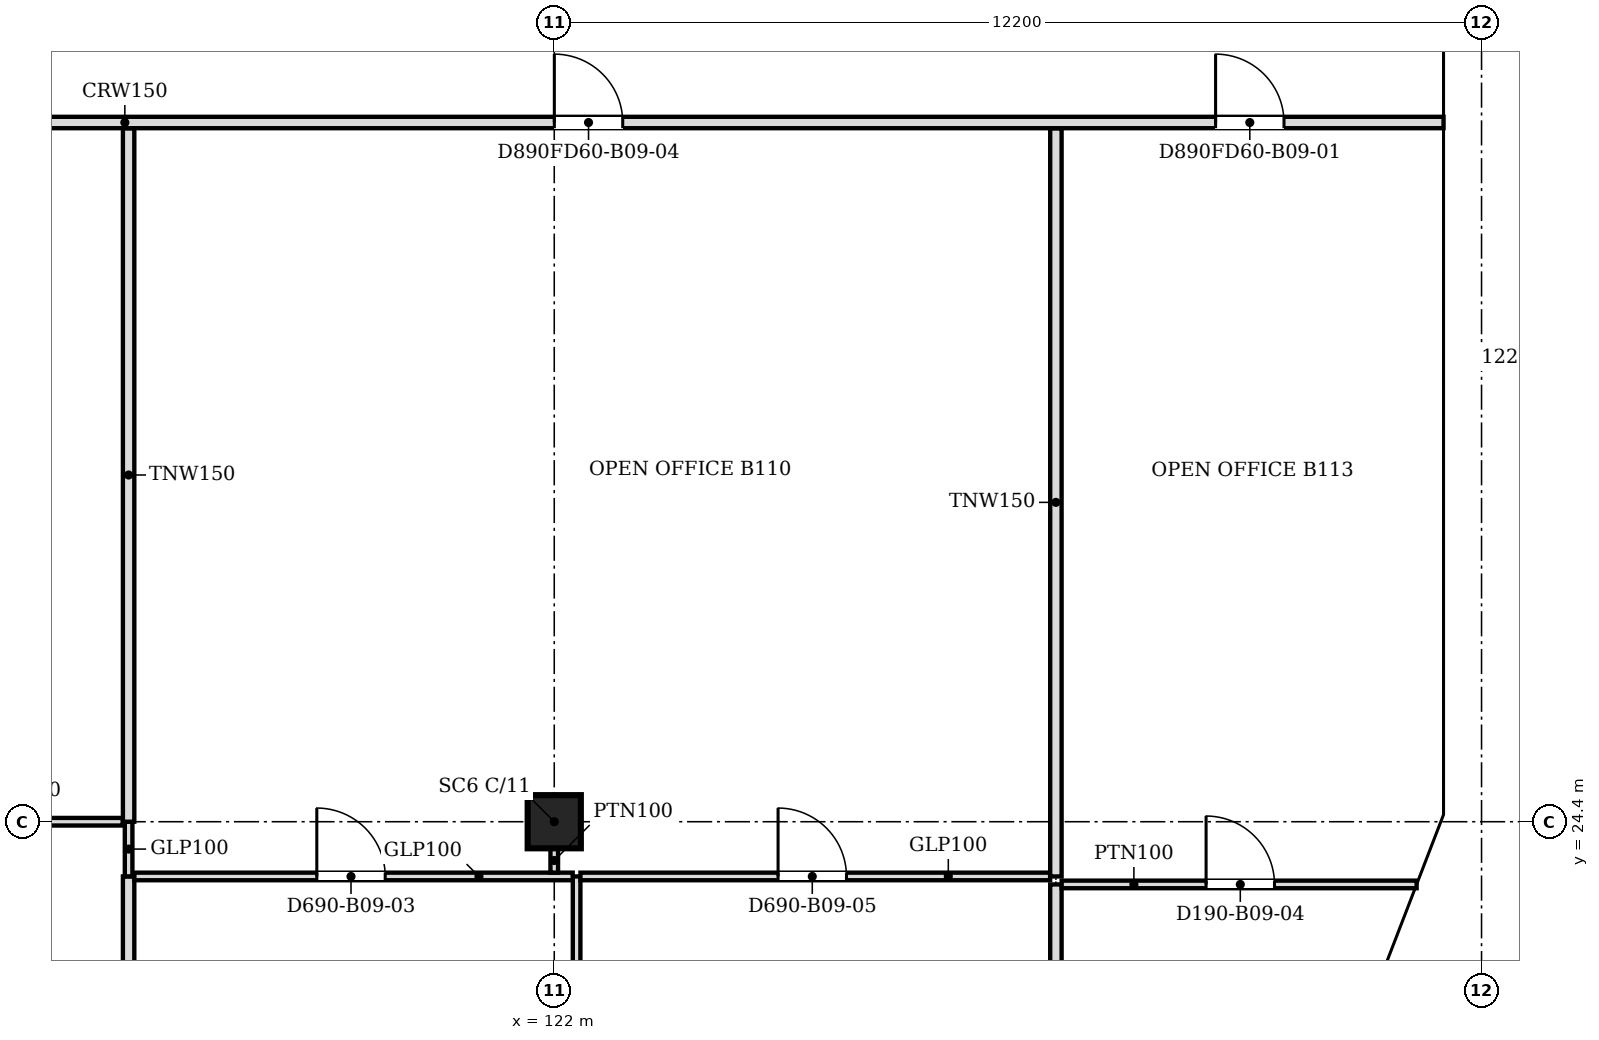
"""IFC4 building model, lengths in metres.
Left out: names, types, materials, properties, quantities, classifications, styles, units other than length and angle.
Written with IfcOpenShell. Run it as: python <this file> out.ifc"""

import sys

from ifc_helpers import new_model, si_unit, direction, frame, frame_2d, origin, origin_2d, place, context, subcontext, project, spatial, polyline, rectangle, outline, extrude, faceted_brep, source, transform, mapped, element, fill, save


model = new_model("IFC4")
c1 = context("Model", 3, precision=1e-05, world=origin(), true_north=direction((0.0, 1.0)))
c2 = subcontext(c1, "Body", "Model", "MODEL_VIEW")
j1 = project(units=[si_unit("LENGTHUNIT", "METRE"), si_unit("PLANEANGLEUNIT", "RADIAN")], contexts=[c1])
p1 = place(None, origin())
s1 = spatial("IfcSite", under=j1, at=p1, CompositionType="ELEMENT")
p2 = place(p1, origin())
s2 = spatial("IfcBuilding", under=s1, at=p2, CompositionType="ELEMENT")
p3 = place(p2, frame((0.0, 0.0, 87.6)))
s3 = spatial("IfcBuildingStorey", under=s2, at=p3, CompositionType="ELEMENT", Elevation=87.6)
p4 = place(p3, frame((122.0, 24.4, 0.0), z_axis=(0.0, 0.0, 1.0), x_axis=(1.0, 0.0, 0.0)))
e1 = element("IfcColumn", 1, at=p4, inside=s3, PredefinedType="COLUMN", context=c2, shape_type="SweptSolid", body=[
    extrude(rectangle(XDim=0.7, YDim=0.7, at=origin_2d()), origin(), (0.0, 0.0, 1.0), 3.6),
])
m1 = source(origin(), c2, "Body", "Brep", [
    faceted_brep([(2.95, -0.25, 0.0), (2.997, -0.25, 0.059), (2.997, -0.25, 7.541), (2.95, -0.25, 7.6), (0.0, -0.25, 3.8), (0.053, 0.25, 3.868), (2.904, 0.25, 7.54), (2.904, 0.25, 0.06), (0.053, 0.25, 3.732), (2.95, 0.0, 0.0), (2.95, 0.0, 7.6), (0.0, 0.0, 3.8)], [[[0, 1, 2, 3, 4]], [[5, 6, 7, 8]], [[1, 0, 9]], [[10, 3, 2]], [[6, 5, 11, 4, 3, 10]], [[8, 7, 9, 0, 4, 11]], [[8, 11, 5]], [[1, 9, 7, 6, 10, 2]]]),
])
p5 = place(p3, frame((132.888, 21.694, -3.8), z_axis=(0.0, 0.0, 1.0), x_axis=(0.359901446078, 0.932990326376, 0.0)))
e2 = element("IfcWall", 2, at=p5, inside=s3, PredefinedType="SOLIDWALL", context=c2, shape_type="MappedRepresentation", body=[
    mapped(m1, transform((0.0, 0.0, 0.0), scale=1.0)),
])
m2 = source(origin(), c2, "Body", "SweptSolid", [
    extrude(outline(polyline([(2.75, 6.935), (0.316, 3.8), (2.75, 0.665), (2.75, 6.935)])), frame((0.0, 0.26, 0.0), z_axis=(0.0, -1.0, 0.0), x_axis=(1.0, 0.0, 0.0)), (0.0, 0.0, 1.0), 0.52),
])
p6 = place(p5, origin())
e3 = element("IfcOpeningElement", 3, at=p6, cuts=e2, PredefinedType="OPENING", context=c2, shape_type="MappedRepresentation", body=[
    mapped(m2, transform((0.0, 0.0, 0.0), scale=1.0)),
])
m3 = source(origin(), c2, "Body", "Brep", [
    faceted_brep([(0.047, -0.25, 0.0), (3.05, -0.25, 3.8), (0.047, -0.25, 7.6), (0.0, -0.25, 7.54), (0.0, -0.25, 0.06), (0.093, 0.25, 7.541), (3.05, 0.25, 3.8), (0.093, 0.25, 0.059), (0.047, 0.0, 0.0), (0.047, 0.0, 7.6)], [[[0, 1, 2, 3, 4]], [[5, 6, 7]], [[7, 6, 1, 0, 8]], [[6, 5, 9, 2, 1]], [[3, 2, 9]], [[8, 0, 4]], [[7, 8, 4, 3, 9, 5]]]),
])
p7 = place(p3, frame((133.95, 24.4, -3.8), z_axis=(0.0, 0.0, 1.0), x_axis=(0.0, 1.0, 0.0)))
e4 = element("IfcWall", 4, at=p7, inside=s3, PredefinedType="SOLIDWALL", context=c2, shape_type="MappedRepresentation", body=[
    mapped(m3, transform((0.0, 0.0, 0.0), scale=1.0)),
])
m4 = source(origin(), c2, "Body", "SweptSolid", [
    extrude(outline(polyline([(0.247, 0.656), (2.731, 3.8), (0.247, 6.944), (0.247, 0.656)])), frame((0.0, 0.26, 0.0), z_axis=(0.0, -1.0, 0.0), x_axis=(1.0, 0.0, 0.0)), (0.0, 0.0, 1.0), 0.52),
])
p8 = place(p7, origin())
e5 = element("IfcOpeningElement", 5, at=p8, cuts=e4, PredefinedType="OPENING", context=c2, shape_type="MappedRepresentation", body=[
    mapped(m4, transform((0.0, 0.0, 0.0), scale=1.0)),
])
m5 = source(origin(), c2, "Body", "SweptSolid", [
    extrude(outline(polyline([(3.05, 0.0), (6.1, 3.8), (3.05, 7.6), (0.0, 3.8), (3.05, 0.0)])), frame((0.0, 0.25, 0.0), z_axis=(0.0, -1.0, 0.0), x_axis=(1.0, 0.0, 0.0)), (0.0, 0.0, 1.0), 0.5),
])
p9 = place(p3, frame((133.95, 27.45, -3.8), z_axis=(0.0, 0.0, 1.0), x_axis=(0.0, 1.0, 0.0)))
e6 = element("IfcWall", 6, at=p9, inside=s3, PredefinedType="SOLIDWALL", context=c2, shape_type="MappedRepresentation", body=[
    mapped(m5, transform((0.0, 0.0, 0.0), scale=1.0)),
])
m6 = source(origin(), c2, "Body", "SweptSolid", [
    extrude(outline(polyline([(3.05, 0.399), (5.78, 3.8), (3.05, 7.2), (0.321, 3.8), (3.05, 0.399)])), frame((0.0, 0.26, 0.0), z_axis=(0.0, -1.0, 0.0), x_axis=(1.0, 0.0, 0.0)), (0.0, 0.0, 1.0), 0.52),
])
p10 = place(p9, origin())
e7 = element("IfcOpeningElement", 7, at=p10, cuts=e6, PredefinedType="OPENING", context=c2, shape_type="MappedRepresentation", body=[
    mapped(m6, transform((0.0, 0.0, 0.0), scale=1.0)),
])
m7 = source(origin(), c2, "Body", "Brep", [
    faceted_brep([(3.05, -0.25, 0.0), (6.1, -0.25, 3.8), (6.1, -0.25, 3.8), (3.05, -0.25, 7.6), (0.0, -0.25, 3.8), (0.0, 0.25, 3.8), (3.05, 0.25, 7.6), (6.1, 0.25, 3.8), (6.1, 0.25, 3.8), (3.05, 0.25, 0.0)], [[[0, 1, 2, 3, 4]], [[5, 6, 7, 8, 9]], [[9, 8, 1, 0]], [[7, 6, 3, 2]], [[6, 5, 4, 3]], [[5, 9, 0, 4]], [[1, 8, 7, 2]]]),
])
p11 = place(p3, frame((133.95, 33.55, -3.8), z_axis=(0.0, 0.0, 1.0), x_axis=(0.0, 1.0, 0.0)))
e8 = element("IfcWall", 8, at=p11, inside=s3, PredefinedType="SOLIDWALL", context=c2, shape_type="MappedRepresentation", body=[
    mapped(m7, transform((0.0, 0.0, 0.0), scale=1.0)),
])
p12 = place(p11, origin())
e9 = element("IfcOpeningElement", 9, at=p12, cuts=e8, PredefinedType="OPENING", context=c2, shape_type="MappedRepresentation", body=[
    mapped(m6, transform((0.0, 0.0, 0.0), scale=1.0)),
])
p13 = place(p2, frame((0.0, 0.0, 91.4)))
s4 = spatial("IfcBuildingStorey", under=s2, at=p13, CompositionType="ELEMENT", Elevation=91.4)
m8 = source(origin(), c2, "Body", "Brep", [
    faceted_brep([(0.053, -0.25, 0.0), (3.003, -0.25, 3.8), (0.053, -0.25, 7.6), (0.0, -0.25, 7.531), (0.0, -0.25, 0.068), (0.106, 0.25, 7.532), (2.957, 0.25, 3.86), (2.957, 0.25, 3.74), (0.106, 0.25, 0.068), (3.003, 0.0, 3.8), (0.053, 0.0, 0.0), (0.053, 0.0, 7.6)], [[[0, 1, 2, 3, 4]], [[5, 6, 7, 8]], [[8, 7, 9, 1, 0, 10]], [[6, 5, 11, 2, 1, 9]], [[3, 2, 11]], [[10, 0, 4]], [[8, 10, 4, 3, 11, 5]], [[9, 7, 6]]]),
])
p14 = place(p13, frame((132.869, 21.644, -3.8), z_axis=(0.0, 0.0, 1.0), x_axis=(0.359855894603, 0.933007896601, 0.0)))
e10 = element("IfcWall", 10, at=p14, inside=s4, PredefinedType="SOLIDWALL", context=c2, shape_type="MappedRepresentation", body=[
    mapped(m8, transform((0.0, 0.0, 0.0), scale=1.0)),
])
m9 = source(origin(), c2, "Body", "SweptSolid", [
    extrude(outline(polyline([(0.253, 0.665), (2.687, 3.8), (0.253, 6.935), (0.253, 0.665)])), frame((0.0, 0.26, 0.0), z_axis=(0.0, -1.0, 0.0), x_axis=(1.0, 0.0, 0.0)), (0.0, 0.0, 1.0), 0.52),
])
p15 = place(p14, origin())
e11 = element("IfcOpeningElement", 11, at=p15, cuts=e10, PredefinedType="OPENING", context=c2, shape_type="MappedRepresentation", body=[
    mapped(m9, transform((0.0, 0.0, 0.0), scale=1.0)),
])
m10 = source(origin(), c2, "Body", "Brep", [
    faceted_brep([(3.003, -0.25, 0.0), (6.053, -0.25, 3.8), (3.003, -0.25, 7.6), (0.0, -0.25, 3.8), (0.047, 0.25, 3.859), (3.003, 0.25, 7.6), (6.053, 0.25, 3.8), (3.003, 0.25, 0.0), (0.047, 0.25, 3.741), (0.0, 0.0, 3.8)], [[[0, 1, 2, 3]], [[4, 5, 6, 7, 8]], [[7, 6, 1, 0]], [[6, 5, 2, 1]], [[5, 4, 9, 3, 2]], [[8, 7, 0, 3, 9]], [[8, 9, 4]]]),
])
p16 = place(p13, frame((133.95, 24.447, -3.8), z_axis=(0.0, 0.0, 1.0), x_axis=(0.0, 1.0, 0.0)))
e12 = element("IfcWall", 12, at=p16, inside=s4, PredefinedType="SOLIDWALL", context=c2, shape_type="MappedRepresentation", body=[
    mapped(m10, transform((0.0, 0.0, 0.0), scale=1.0)),
])
m11 = source(origin(), c2, "Body", "SweptSolid", [
    extrude(outline(polyline([(3.005, 0.401), (5.733, 3.8), (3.005, 7.199), (0.319, 3.8), (3.005, 0.401)])), frame((0.0, 0.26, 0.0), z_axis=(0.0, -1.0, 0.0), x_axis=(1.0, 0.0, 0.0)), (0.0, 0.0, 1.0), 0.52),
])
p17 = place(p16, origin())
e13 = element("IfcOpeningElement", 13, at=p17, cuts=e12, PredefinedType="OPENING", context=c2, shape_type="MappedRepresentation", body=[
    mapped(m11, transform((0.0, 0.0, 0.0), scale=1.0)),
])
m12 = source(origin(), c2, "Body", "SweptSolid", [
    extrude(outline(polyline([(3.05, 0.0), (6.1, 3.8), (3.05, 7.6), (0.0, 3.8), (3.05, 0.0)])), frame((0.0, 0.25, 0.0), z_axis=(0.0, -1.0, 0.0), x_axis=(1.0, 0.0, 0.0)), (0.0, 0.0, 1.0), 0.5),
])
p18 = place(p13, frame((133.95, 30.5, -3.8), z_axis=(0.0, 0.0, 1.0), x_axis=(0.0, 1.0, 0.0)))
e14 = element("IfcWall", 14, at=p18, inside=s4, PredefinedType="SOLIDWALL", context=c2, shape_type="MappedRepresentation", body=[
    mapped(m12, transform((0.0, 0.0, 0.0), scale=1.0)),
])
m13 = source(origin(), c2, "Body", "SweptSolid", [
    extrude(outline(polyline([(3.05, 0.399), (5.78, 3.8), (3.05, 7.2), (0.321, 3.8), (3.05, 0.399)])), frame((0.0, 0.26, 0.0), z_axis=(0.0, -1.0, 0.0), x_axis=(1.0, 0.0, 0.0)), (0.0, 0.0, 1.0), 0.52),
])
p19 = place(p18, origin())
e15 = element("IfcOpeningElement", 15, at=p19, cuts=e14, PredefinedType="OPENING", context=c2, shape_type="MappedRepresentation", body=[
    mapped(m13, transform((0.0, 0.0, 0.0), scale=1.0)),
])
p20 = place(p3, frame((116.4, 18.8, 0.0), z_axis=(0.0, 0.0, 1.0), x_axis=(0.0, 1.0, 0.0)))
e16 = element("IfcWall", 16, at=p20, inside=s3, PredefinedType="PARTITIONING", context=c2, shape_type="SweptSolid", body=[
    extrude(rectangle(XDim=4.88, YDim=0.15, at=frame_2d((2.44, 0.0))), origin(), (0.0, 0.0, 1.0), 3.067),
])
p21 = place(p3, frame((122.294, 18.8, 0.0), z_axis=(0.0, 0.0, 1.0), x_axis=(0.0, 1.0, 0.0)))
e17 = element("IfcWall", 17, at=p21, inside=s3, PredefinedType="PARTITIONING", context=c2, shape_type="SweptSolid", body=[
    extrude(rectangle(XDim=4.88, YDim=0.1, at=frame_2d((2.44, 0.0))), origin(), (0.0, 0.0, 1.0), 3.067),
])
p22 = place(p3, frame((128.6, 19.029, 0.0), z_axis=(0.0, 0.0, 1.0), x_axis=(0.0, 1.0, 0.0)))
e18 = element("IfcWall", 18, at=p22, inside=s3, PredefinedType="PARTITIONING", context=c2, shape_type="SweptSolid", body=[
    extrude(rectangle(XDim=4.546, YDim=0.15, at=frame_2d((2.273, 0.0))), origin(), (0.0, 0.0, 1.0), 3.067),
])
p23 = place(p3, frame((133.346, 23.575, 0.0), z_axis=(0.0, 0.0, 1.0), x_axis=(-1.0, 0.0, 0.0)))
e19 = element("IfcWall", 19, at=p23, inside=s3, PredefinedType="PARTITIONING", context=c2, shape_type="SweptSolid", body=[
    extrude(rectangle(XDim=4.67, YDim=0.1, at=frame_2d((2.335, 0.0))), origin(), (0.0, 0.0, 1.0), 3.067),
])
m14 = source(origin(), c2, "Body", "SweptSolid", [
    extrude(rectangle(XDim=0.9, YDim=2.1, at=frame_2d((0.45, 1.05))), frame((0.0, 0.06, 0.0), z_axis=(0.0, -1.0, 0.0), x_axis=(1.0, 0.0, 0.0)), (0.0, 0.0, 1.0), 0.12),
])
p24 = place(p23, frame((1.87, 0.0, 0.0)))
e20 = element("IfcOpeningElement", 20, at=p24, cuts=e19, PredefinedType="OPENING", context=c2, shape_type="MappedRepresentation", body=[
    mapped(m14, transform((0.0, 0.0, 0.0), scale=1.0)),
])
p25 = place(p3, frame((116.4, 23.681, 0.0), z_axis=(0.0, 0.0, 1.0), x_axis=(0.0, 1.0, 0.0)))
e21 = element("IfcWall", 21, at=p25, inside=s3, PredefinedType="PARTITIONING", context=c2, shape_type="SweptSolid", body=[
    extrude(rectangle(XDim=0.718, YDim=0.1, at=frame_2d((0.359, 0.0))), origin(), (0.0, 0.0, 1.0), 3.067),
])
p26 = place(p3, frame((122.243, 23.68, 0.0), z_axis=(0.0, 0.0, 1.0), x_axis=(-1.0, 0.0, 0.0)))
e22 = element("IfcWall", 22, at=p26, inside=s3, PredefinedType="PARTITIONING", context=c2, shape_type="SweptSolid", body=[
    extrude(rectangle(XDim=5.767, YDim=0.1, at=frame_2d((2.883, 0.0))), origin(), (0.0, 0.0, 1.0), 3.067),
])
p27 = place(p26, frame((2.467, 0.0, 0.0)))
e23 = element("IfcOpeningElement", 23, at=p27, cuts=e22, PredefinedType="OPENING", context=c2, shape_type="MappedRepresentation", body=[
    mapped(m14, transform((0.0, 0.0, 0.0), scale=1.0)),
])
p28 = place(p3, frame((128.524, 23.68, 0.0), z_axis=(0.0, 0.0, 1.0), x_axis=(-1.0, 0.0, 0.0)))
e24 = element("IfcWall", 24, at=p28, inside=s3, PredefinedType="PARTITIONING", context=c2, shape_type="SweptSolid", body=[
    extrude(rectangle(XDim=6.179, YDim=0.1, at=frame_2d((3.09, 0.0))), origin(), (0.0, 0.0, 1.0), 3.067),
])
p29 = place(p28, frame((2.679, 0.0, 0.0)))
e25 = element("IfcOpeningElement", 25, at=p29, cuts=e24, PredefinedType="OPENING", context=c2, shape_type="MappedRepresentation", body=[
    mapped(m14, transform((0.0, 0.0, 0.0), scale=1.0)),
])
p30 = place(p3, frame((128.6, 23.68, 0.0), z_axis=(0.0, 0.0, 1.0), x_axis=(0.0, 1.0, 0.0)))
e26 = element("IfcWall", 26, at=p30, inside=s3, PredefinedType="PARTITIONING", context=c2, shape_type="SweptSolid", body=[
    extrude(rectangle(XDim=9.844, YDim=0.15, at=frame_2d((4.922, 0.0))), origin(), (0.0, 0.0, 1.0), 3.067),
])
p31 = place(p3, frame((122.0, 24.05, 0.0), z_axis=(0.0, 0.0, 1.0), x_axis=(0.0, -1.0, 0.0)))
e27 = element("IfcWall", 27, at=p31, inside=s3, PredefinedType="PARTITIONING", context=c2, shape_type="SweptSolid", body=[
    extrude(rectangle(XDim=0.32, YDim=0.1, at=frame_2d((0.16, 0.0))), origin(), (0.0, 0.0, 1.0), 3.067),
])
p32 = place(p3, frame((116.324, 24.4, 0.0), z_axis=(0.0, 0.0, 1.0), x_axis=(-1.0, 0.0, 0.0)))
e28 = element("IfcWall", 28, at=p32, inside=s3, PredefinedType="PARTITIONING", context=c2, shape_type="SweptSolid", body=[
    extrude(rectangle(XDim=6.173, YDim=0.1, at=frame_2d((3.086, 0.0))), origin(), (0.0, 0.0, 1.0), 3.067),
])
p33 = place(p32, frame((2.673, 0.0, 0.0)))
e29 = element("IfcOpeningElement", 29, at=p33, cuts=e28, PredefinedType="OPENING", context=c2, shape_type="MappedRepresentation", body=[
    mapped(m14, transform((0.0, 0.0, 0.0), scale=1.0)),
])
p34 = place(p3, frame((116.4, 24.4, 0.0), z_axis=(0.0, 0.0, 1.0), x_axis=(0.0, 1.0, 0.0)))
e30 = element("IfcWall", 30, at=p34, inside=s3, PredefinedType="PARTITIONING", context=c2, shape_type="SweptSolid", body=[
    extrude(rectangle(XDim=9.124, YDim=0.15, at=frame_2d((4.562, 0.0))), origin(), (0.0, 0.0, 1.0), 3.067),
])
p35 = place(p3, frame((133.7, 33.6, 0.0), z_axis=(0.0, 0.0, 1.0), x_axis=(-1.0, 0.0, 0.0)))
e31 = element("IfcWall", 31, at=p35, inside=s3, PredefinedType="PARTITIONING", context=c2, shape_type="SweptSolid", body=[
    extrude(rectangle(XDim=47.8, YDim=0.15, at=frame_2d((23.9, 0.0))), origin(), (0.0, 0.0, 1.0), 3.067),
])
m15 = source(origin(), c2, "Body", "SweptSolid", [
    extrude(rectangle(XDim=0.9, YDim=2.1, at=frame_2d((0.45, 1.05))), frame((0.0, 0.085, 0.0), z_axis=(0.0, -1.0, 0.0), x_axis=(1.0, 0.0, 0.0)), (0.0, 0.0, 1.0), 0.17),
])
p36 = place(p35, frame((2.099, 0.0, 0.0)))
e32 = element("IfcOpeningElement", 32, at=p36, cuts=e31, PredefinedType="OPENING", context=c2, shape_type="MappedRepresentation", body=[
    mapped(m15, transform((0.0, 0.0, 0.0), scale=1.0)),
])
m16 = source(origin(), c2, "Body", "SweptSolid", [
    extrude(rectangle(XDim=1.0, YDim=2.1, at=frame_2d((0.5, 1.05))), frame((0.0, 0.085, 0.0), z_axis=(0.0, -1.0, 0.0), x_axis=(1.0, 0.0, 0.0)), (0.0, 0.0, 1.0), 0.17),
])
p37 = place(p35, frame((38.399, 0.0, 0.0)))
e33 = element("IfcOpeningElement", 33, at=p37, cuts=e31, PredefinedType="OPENING", context=c2, shape_type="MappedRepresentation", body=[
    mapped(m16, transform((0.0, 0.0, 0.0), scale=1.0)),
])
p38 = place(p35, frame((44.3, 0.0, 0.0)))
e34 = element("IfcOpeningElement", 34, at=p38, cuts=e31, PredefinedType="OPENING", context=c2, shape_type="MappedRepresentation", body=[
    mapped(m15, transform((0.0, 0.0, 0.0), scale=1.0)),
])
p39 = place(p35, frame((32.4, 0.0, 0.0)))
e35 = element("IfcOpeningElement", 35, at=p39, cuts=e31, PredefinedType="OPENING", context=c2, shape_type="MappedRepresentation", body=[
    mapped(m15, transform((0.0, 0.0, 0.0), scale=1.0)),
])
p40 = place(p35, frame((10.799, 0.0, 0.0)))
e36 = element("IfcOpeningElement", 36, at=p40, cuts=e31, PredefinedType="OPENING", context=c2, shape_type="MappedRepresentation", body=[
    mapped(m15, transform((0.0, 0.0, 0.0), scale=1.0)),
])
p41 = place(p35, frame((23.0, 0.0, 0.0)))
e37 = element("IfcOpeningElement", 37, at=p41, cuts=e31, PredefinedType="OPENING", context=c2, shape_type="MappedRepresentation", body=[
    mapped(m15, transform((0.0, 0.0, 0.0), scale=1.0)),
])
m17 = source(origin(), c2, "Body", "SweptSolid", [
    extrude(rectangle(XDim=0.9, YDim=2.1, at=frame_2d((0.45, 1.05))), frame((0.0, 0.025, 0.0), z_axis=(0.0, -1.0, 0.0), x_axis=(1.0, 0.0, 0.0)), (0.0, 0.0, 1.0), 0.05),
])
p42 = place(p24, origin())
e38 = element("IfcDoor", 38, at=p42, inside=s3, OperationType="SINGLE_SWING_RIGHT", PredefinedType="DOOR", context=c2, shape_type="MappedRepresentation", body=[
    mapped(m17, transform((0.0, 0.0, 0.0), scale=1.0)),
])
fill(e20, e38)
p43 = place(p36, origin())
e39 = element("IfcDoor", 39, at=p43, inside=s3, OperationType="SINGLE_SWING_RIGHT", PredefinedType="DOOR", context=c2, shape_type="MappedRepresentation", body=[
    mapped(m17, transform((0.0, 0.0, 0.0), scale=1.0)),
])
fill(e32, e39)
p44 = place(p27, origin())
e40 = element("IfcDoor", 40, at=p44, inside=s3, OperationType="SINGLE_SWING_RIGHT", PredefinedType="DOOR", context=c2, shape_type="MappedRepresentation", body=[
    mapped(m17, transform((0.0, 0.0, 0.0), scale=1.0)),
])
fill(e23, e40)
p45 = place(p29, origin())
e41 = element("IfcDoor", 41, at=p45, inside=s3, OperationType="SINGLE_SWING_RIGHT", PredefinedType="DOOR", context=c2, shape_type="MappedRepresentation", body=[
    mapped(m17, transform((0.0, 0.0, 0.0), scale=1.0)),
])
fill(e25, e41)
p46 = place(p40, origin())
e42 = element("IfcDoor", 42, at=p46, inside=s3, OperationType="SINGLE_SWING_RIGHT", PredefinedType="DOOR", context=c2, shape_type="MappedRepresentation", body=[
    mapped(m17, transform((0.0, 0.0, 0.0), scale=1.0)),
])
fill(e36, e42)
save(model, sys.argv[1])
